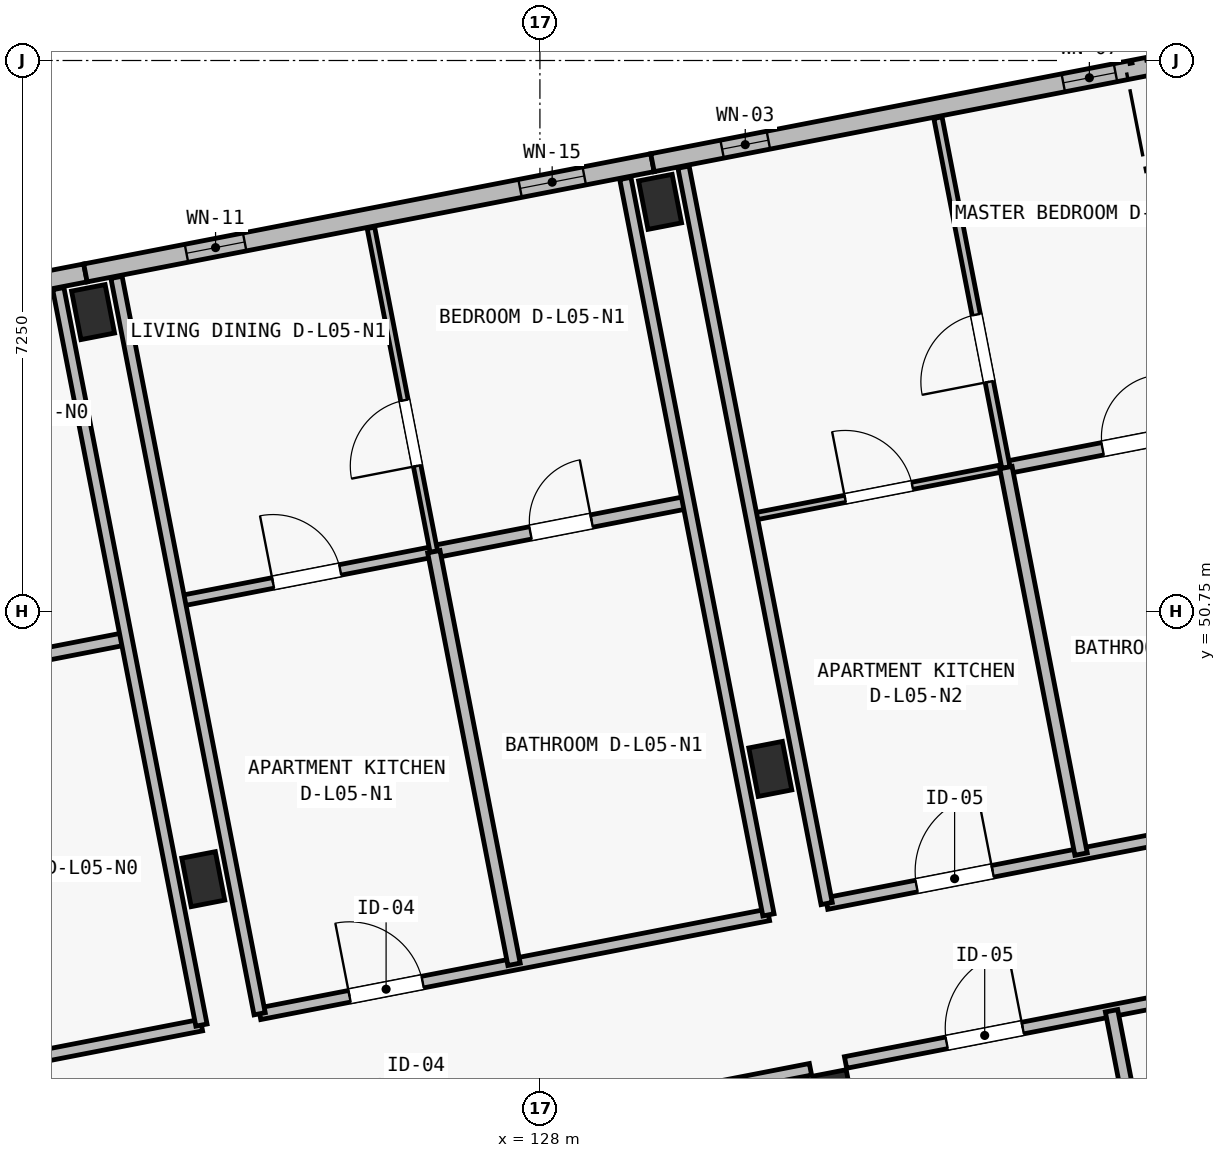
"""IFC4 building model, lengths in metres.
Left out: names, types, materials, properties, quantities, classifications, styles, units other than length and angle.
Written with IfcOpenShell. Run it as: python <this file> out.ifc"""

import sys

from ifc_helpers import new_model, si_unit, direction, frame, frame_2d, origin, origin_2d, place, context, subcontext, project, spatial, rectangle, extrude, element, fill, save


model = new_model("IFC4")
c1 = context("Model", 3, precision=1e-05, world=origin(), true_north=direction((0.0, 1.0)))
c2 = subcontext(c1, "Body", "Model", "MODEL_VIEW")
j1 = project(units=[si_unit("LENGTHUNIT", "METRE"), si_unit("PLANEANGLEUNIT", "RADIAN")], contexts=[c1])
p1 = place(None, origin())
s1 = spatial("IfcSite", under=j1, at=p1, CompositionType="ELEMENT")
p2 = place(p1, origin())
s2 = spatial("IfcBuilding", under=s1, at=p2, CompositionType="ELEMENT")
p3 = place(p2, frame((0.0, 0.0, 18.15)))
s3 = spatial("IfcBuildingStorey", under=s2, at=p3, CompositionType="ELEMENT", Elevation=18.15)
for number, where, z_axis, x_axis in (
    (1, (123.571, 47.23, 0.0), (0.0, 0.0, 1.0), (0.982, 0.191, 0.0)),
    (2, (122.121, 54.69, 0.0), (0.0, 0.0, 1.0), (0.982, 0.191, 0.0)),
    (3, (131.871, 44.361, 0.0), (0.0, 0.0, 1.0), (0.982, 0.191, 0.0)),
    (4, (131.031, 48.68, 0.0), (0.0, 0.0, 1.0), (0.982, 0.191, 0.0)),
    (5, (129.581, 56.14, 0.0), (0.0, 0.0, 1.0), (0.982, 0.191, 0.0)),
):
    element("IfcColumn", number, at=place(p3, frame(where, z_axis=z_axis, x_axis=x_axis)), inside=s3, PredefinedType="COLUMN", context=c2, shape_type="SweptSolid", body=[
        extrude(rectangle(XDim=0.45, YDim=0.65, at=origin_2d()), origin(), (0.0, 0.0, 1.0), 3.25),
    ])
p4 = place(p3, frame((114.045, 53.655, 0.0), z_axis=(0.0, 0.0, 1.0), x_axis=(0.981627273155, 0.190808533872, 0.0)))
e6 = element("IfcWall", 6, at=p4, inside=s3, PredefinedType="SOLIDWALL", context=c2, shape_type="SweptSolid", body=[
    extrude(rectangle(XDim=8.125, YDim=0.24, at=frame_2d((4.062, 0.0))), origin(), (0.0, 0.0, 1.0), 3.0),
])
p5 = place(p4, frame((2.41, 0.0, 0.5)))
e7 = element("IfcOpeningElement", 7, at=p5, cuts=e6, PredefinedType="OPENING", context=c2, shape_type="SweptSolid", body=[
    extrude(rectangle(XDim=0.64, YDim=2.18, at=frame_2d((0.32, 1.09))), frame((0.0, 0.135, 0.0), z_axis=(0.0, -1.0, 0.0), x_axis=(1.0, 0.0, 0.0)), (0.0, 0.0, 1.0), 0.27),
])
p6 = place(p4, frame((5.551, 0.0, 0.44)))
e8 = element("IfcOpeningElement", 8, at=p6, cuts=e6, PredefinedType="OPENING", context=c2, shape_type="SweptSolid", body=[
    extrude(rectangle(XDim=0.72, YDim=2.16, at=frame_2d((0.36, 1.08))), frame((0.0, 0.135, 0.0), z_axis=(0.0, -1.0, 0.0), x_axis=(1.0, 0.0, 0.0)), (0.0, 0.0, 1.0), 0.27),
])
p7 = place(p3, frame((122.02, 55.205, 0.0), z_axis=(0.0, 0.0, 1.0), x_axis=(0.981626422232, 0.190812911449, 0.0)))
e9 = element("IfcWall", 9, at=p7, inside=s3, PredefinedType="SOLIDWALL", context=c2, shape_type="SweptSolid", body=[
    extrude(rectangle(XDim=7.6, YDim=0.24, at=frame_2d((3.8, 0.0))), origin(), (0.0, 0.0, 1.0), 3.0),
])
p8 = place(p7, frame((1.354, 0.0, 0.44)))
e10 = element("IfcOpeningElement", 10, at=p8, cuts=e9, PredefinedType="OPENING", context=c2, shape_type="SweptSolid", body=[
    extrude(rectangle(XDim=0.78, YDim=2.2, at=frame_2d((0.39, 1.1))), frame((0.0, 0.135, 0.0), z_axis=(0.0, -1.0, 0.0), x_axis=(1.0, 0.0, 0.0)), (0.0, 0.0, 1.0), 0.27),
])
p9 = place(p7, frame((5.826, 0.0, 0.5)))
e11 = element("IfcOpeningElement", 11, at=p9, cuts=e9, PredefinedType="OPENING", context=c2, shape_type="SweptSolid", body=[
    extrude(rectangle(XDim=0.86, YDim=2.36, at=frame_2d((0.43, 1.18))), frame((0.0, 0.135, 0.0), z_axis=(0.0, -1.0, 0.0), x_axis=(1.0, 0.0, 0.0)), (0.0, 0.0, 1.0), 0.27),
])
p10 = place(p3, frame((129.481, 56.656, 0.0), z_axis=(0.0, 0.0, 1.0), x_axis=(0.981626422232, 0.190812911449, 0.0)))
e12 = element("IfcWall", 12, at=p10, inside=s3, PredefinedType="SOLIDWALL", context=c2, shape_type="SweptSolid", body=[
    extrude(rectangle(XDim=7.6, YDim=0.24, at=frame_2d((3.8, 0.0))), origin(), (0.0, 0.0, 1.0), 3.0),
])
p11 = place(p10, frame((0.934, 0.0, 0.5)))
e13 = element("IfcOpeningElement", 13, at=p11, cuts=e12, PredefinedType="OPENING", context=c2, shape_type="SweptSolid", body=[
    extrude(rectangle(XDim=0.62, YDim=2.28, at=frame_2d((0.31, 1.14))), frame((0.0, 0.135, 0.0), z_axis=(0.0, -1.0, 0.0), x_axis=(1.0, 0.0, 0.0)), (0.0, 0.0, 1.0), 0.27),
])
p12 = place(p10, frame((5.506, 0.0, 0.44)))
e14 = element("IfcOpeningElement", 14, at=p12, cuts=e12, PredefinedType="OPENING", context=c2, shape_type="SweptSolid", body=[
    extrude(rectangle(XDim=0.7, YDim=2.36, at=frame_2d((0.35, 1.18))), frame((0.0, 0.135, 0.0), z_axis=(0.0, -1.0, 0.0), x_axis=(1.0, 0.0, 0.0)), (0.0, 0.0, 1.0), 0.27),
])
p13 = place(p3, frame((124.561, 43.368, 0.0), z_axis=(0.0, 0.0, 1.0), x_axis=(0.981630356092, 0.190792672811, 0.0)))
e15 = element("IfcWall", 15, at=p13, inside=s3, PredefinedType="PARTITIONING", context=c2, shape_type="SweptSolid", body=[
    extrude(rectangle(XDim=7.13, YDim=0.155, at=frame_2d((3.565, 0.0))), origin(), (0.0, 0.0, 1.0), 2.97),
])
p14 = place(p13, frame((1.355, 0.0, 0.0)))
e16 = element("IfcOpeningElement", 16, at=p14, cuts=e15, PredefinedType="OPENING", context=c2, shape_type="SweptSolid", body=[
    extrude(rectangle(XDim=0.98, YDim=2.15, at=frame_2d((0.49, 1.075))), frame((0.0, 0.093, 0.0), z_axis=(0.0, -1.0, 0.0), x_axis=(1.0, 0.0, 0.0)), (0.0, 0.0, 1.0), 0.185),
])
p15 = place(p3, frame((132.021, 44.818, 0.0), z_axis=(0.0, 0.0, 1.0), x_axis=(0.981629109582, 0.190799086008, 0.0)))
e17 = element("IfcWall", 17, at=p15, inside=s3, PredefinedType="PARTITIONING", context=c2, shape_type="SweptSolid", body=[
    extrude(rectangle(XDim=7.13, YDim=0.155, at=frame_2d((3.565, 0.0))), origin(), (0.0, 0.0, 1.0), 2.97),
])
p16 = place(p15, frame((1.355, 0.0, 0.0)))
e18 = element("IfcOpeningElement", 18, at=p16, cuts=e17, PredefinedType="OPENING", context=c2, shape_type="SweptSolid", body=[
    extrude(rectangle(XDim=1.02, YDim=2.2, at=frame_2d((0.51, 1.1))), frame((0.0, 0.093, 0.0), z_axis=(0.0, -1.0, 0.0), x_axis=(1.0, 0.0, 0.0)), (0.0, 0.0, 1.0), 0.185),
])
p17 = place(p3, frame((136.259, 41.699, 0.0), z_axis=(0.0, 0.0, 1.0), x_axis=(-0.190835887914, 0.981621955686, 0.0)))
e19 = element("IfcWall", 19, at=p17, inside=s3, PredefinedType="PLUMBINGWALL", context=c2, shape_type="SweptSolid", body=[
    extrude(rectangle(XDim=3.87, YDim=0.165, at=frame_2d((1.935, 0.0))), origin(), (0.0, 0.0, 1.0), 2.97),
])
p18 = place(p3, frame((116.852, 44.009, 0.0), z_axis=(0.0, 0.0, 1.0), x_axis=(0.981629173664, 0.190798756314, 0.0)))
e20 = element("IfcWall", 20, at=p18, inside=s3, PredefinedType="PARTITIONING", context=c2, shape_type="SweptSolid", body=[
    extrude(rectangle(XDim=6.82, YDim=0.155, at=frame_2d((3.41, 0.0))), origin(), (0.0, 0.0, 1.0), 2.97),
])
p19 = place(p18, frame((1.205, 0.0, 0.0)))
e21 = element("IfcOpeningElement", 21, at=p19, cuts=e20, PredefinedType="OPENING", context=c2, shape_type="SweptSolid", body=[
    extrude(rectangle(XDim=1.02, YDim=2.2, at=frame_2d((0.51, 1.1))), frame((0.0, 0.093, 0.0), z_axis=(0.0, -1.0, 0.0), x_axis=(1.0, 0.0, 0.0)), (0.0, 0.0, 1.0), 0.185),
])
p20 = place(p3, frame((119.211, 49.744, 0.0), z_axis=(0.0, 0.0, 1.0), x_axis=(0.981629173664, 0.190798756314, 0.0)))
e22 = element("IfcWall", 22, at=p20, inside=s3, PredefinedType="PLUMBINGWALL", context=c2, shape_type="SweptSolid", body=[
    extrude(rectangle(XDim=3.41, YDim=0.165, at=frame_2d((1.705, 0.0))), origin(), (0.0, 0.0, 1.0), 2.97),
])
p21 = place(p20, frame((1.295, 0.0, 0.0)))
e23 = element("IfcOpeningElement", 23, at=p21, cuts=e22, PredefinedType="OPENING", context=c2, shape_type="SweptSolid", body=[
    extrude(rectangle(XDim=0.82, YDim=2.08, at=frame_2d((0.41, 1.04))), frame((0.0, 0.097, 0.0), z_axis=(0.0, -1.0, 0.0), x_axis=(1.0, 0.0, 0.0)), (0.0, 0.0, 1.0), 0.195),
])
p22 = place(p3, frame((123.547, 45.31, 0.0), z_axis=(0.0, 0.0, 1.0), x_axis=(-0.190809410863, 0.981627102685, 0.0)))
e24 = element("IfcWall", 24, at=p22, inside=s3, PredefinedType="PARTITIONING", context=c2, shape_type="SweptSolid", body=[
    extrude(rectangle(XDim=9.87, YDim=0.15, at=frame_2d((4.935, 0.0))), origin(), (0.0, 0.0, 1.0), 2.97),
])
p23 = place(p3, frame((124.312, 45.459, 0.0), z_axis=(0.0, 0.0, 1.0), x_axis=(0.981627870431, 0.190805461121, 0.0)))
e25 = element("IfcWall", 25, at=p23, inside=s3, PredefinedType="PARTITIONING", context=c2, shape_type="SweptSolid", body=[
    extrude(rectangle(XDim=6.82, YDim=0.155, at=frame_2d((3.41, 0.0))), origin(), (0.0, 0.0, 1.0), 2.97),
])
p24 = place(p23, frame((1.205, 0.0, 0.0)))
e26 = element("IfcOpeningElement", 26, at=p24, cuts=e25, PredefinedType="OPENING", context=c2, shape_type="SweptSolid", body=[
    extrude(rectangle(XDim=0.98, YDim=2.15, at=frame_2d((0.49, 1.075))), frame((0.0, 0.093, 0.0), z_axis=(0.0, -1.0, 0.0), x_axis=(1.0, 0.0, 0.0)), (0.0, 0.0, 1.0), 0.185),
])
p25 = place(p3, frame((123.257, 50.887, 0.0), z_axis=(0.0, 0.0, 1.0), x_axis=(0.981629173664, 0.190798756314, 0.0)))
e27 = element("IfcWall", 27, at=p25, inside=s3, PredefinedType="PARTITIONING", context=c2, shape_type="SweptSolid", body=[
    extrude(rectangle(XDim=3.41, YDim=0.14, at=frame_2d((1.705, 0.0))), origin(), (0.0, 0.0, 1.0), 2.97),
])
p26 = place(p25, frame((1.255, 0.0, 0.0)))
e28 = element("IfcOpeningElement", 28, at=p26, cuts=e27, PredefinedType="OPENING", context=c2, shape_type="SweptSolid", body=[
    extrude(rectangle(XDim=0.9, YDim=2.1, at=frame_2d((0.45, 1.05))), frame((0.0, 0.085, 0.0), z_axis=(0.0, -1.0, 0.0), x_axis=(1.0, 0.0, 0.0)), (0.0, 0.0, 1.0), 0.17),
])
p27 = place(p3, frame((126.604, 51.538, 0.0), z_axis=(0.0, 0.0, 1.0), x_axis=(0.98162656706, 0.190812166391, 0.0)))
e29 = element("IfcWall", 29, at=p27, inside=s3, PredefinedType="PLUMBINGWALL", context=c2, shape_type="SweptSolid", body=[
    extrude(rectangle(XDim=3.41, YDim=0.165, at=frame_2d((1.705, 0.0))), origin(), (0.0, 0.0, 1.0), 2.97),
])
p28 = place(p27, frame((1.295, 0.0, 0.0)))
e30 = element("IfcOpeningElement", 30, at=p28, cuts=e29, PredefinedType="OPENING", context=c2, shape_type="SweptSolid", body=[
    extrude(rectangle(XDim=0.82, YDim=2.08, at=frame_2d((0.41, 1.04))), frame((0.0, 0.097, 0.0), z_axis=(0.0, -1.0, 0.0), x_axis=(1.0, 0.0, 0.0)), (0.0, 0.0, 1.0), 0.195),
])
p29 = place(p3, frame((126.604, 51.538, 0.0), z_axis=(0.0, 0.0, 1.0), x_axis=(-0.190812443151, 0.981626513262, 0.0)))
e31 = element("IfcWall", 31, at=p29, inside=s3, PredefinedType="PARTITIONING", context=c2, shape_type="SweptSolid", body=[
    extrude(rectangle(XDim=4.34, YDim=0.1, at=frame_2d((2.17, 0.0))), origin(), (0.0, 0.0, 1.0), 2.97),
])
p30 = place(p29, frame((1.15, 0.0, 0.0)))
e32 = element("IfcOpeningElement", 32, at=p30, cuts=e31, PredefinedType="OPENING", context=c2, shape_type="SweptSolid", body=[
    extrude(rectangle(XDim=0.88, YDim=2.1, at=frame_2d((0.44, 1.05))), frame((0.0, 0.065, 0.0), z_axis=(0.0, -1.0, 0.0), x_axis=(1.0, 0.0, 0.0)), (0.0, 0.0, 1.0), 0.13),
])
p31 = place(p3, frame((127.66, 46.109, 0.0), z_axis=(0.0, 0.0, 1.0), x_axis=(-0.190815300433, 0.981625957848, 0.0)))
e33 = element("IfcWall", 33, at=p31, inside=s3, PredefinedType="PLUMBINGWALL", context=c2, shape_type="SweptSolid", body=[
    extrude(rectangle(XDim=5.53, YDim=0.165, at=frame_2d((2.765, 0.0))), origin(), (0.0, 0.0, 1.0), 2.97),
])
p32 = place(p3, frame((124.312, 45.459, 0.0), z_axis=(0.0, 0.0, 1.0), x_axis=(-0.190814044018, 0.981626202078, 0.0)))
e34 = element("IfcWall", 34, at=p32, inside=s3, PredefinedType="PARTITIONING", context=c2, shape_type="SweptSolid", body=[
    extrude(rectangle(XDim=9.87, YDim=0.15, at=frame_2d((4.935, 0.0))), origin(), (0.0, 0.0, 1.0), 2.97),
])
p33 = place(p3, frame((131.007, 46.76, 0.0), z_axis=(0.0, 0.0, 1.0), x_axis=(-0.190809410863, 0.981627102685, 0.0)))
e35 = element("IfcWall", 35, at=p33, inside=s3, PredefinedType="PARTITIONING", context=c2, shape_type="SweptSolid", body=[
    extrude(rectangle(XDim=9.87, YDim=0.15, at=frame_2d((4.935, 0.0))), origin(), (0.0, 0.0, 1.0), 2.97),
])
p34 = place(p3, frame((131.772, 46.909, 0.0), z_axis=(0.0, 0.0, 1.0), x_axis=(0.981622468528, 0.190833249935, 0.0)))
e36 = element("IfcWall", 36, at=p34, inside=s3, PredefinedType="PARTITIONING", context=c2, shape_type="SweptSolid", body=[
    extrude(rectangle(XDim=6.82, YDim=0.155, at=frame_2d((3.41, 0.0))), origin(), (0.0, 0.0, 1.0), 2.97),
])
p35 = place(p34, frame((1.205, 0.0, 0.0)))
e37 = element("IfcOpeningElement", 37, at=p35, cuts=e36, PredefinedType="OPENING", context=c2, shape_type="SweptSolid", body=[
    extrude(rectangle(XDim=1.02, YDim=2.2, at=frame_2d((0.51, 1.1))), frame((0.0, 0.093, 0.0), z_axis=(0.0, -1.0, 0.0), x_axis=(1.0, 0.0, 0.0)), (0.0, 0.0, 1.0), 0.185),
])
p36 = place(p3, frame((130.784, 51.994, 0.0), z_axis=(0.0, 0.0, 1.0), x_axis=(0.981629173664, 0.190798756314, 0.0)))
e38 = element("IfcWall", 38, at=p36, inside=s3, PredefinedType="PARTITIONING", context=c2, shape_type="SweptSolid", body=[
    extrude(rectangle(XDim=3.41, YDim=0.095, at=frame_2d((1.705, 0.0))), origin(), (0.0, 0.0, 1.0), 2.97),
])
p37 = place(p36, frame((1.255, 0.0, 0.0)))
e39 = element("IfcOpeningElement", 39, at=p37, cuts=e38, PredefinedType="OPENING", context=c2, shape_type="SweptSolid", body=[
    extrude(rectangle(XDim=0.9, YDim=2.1, at=frame_2d((0.45, 1.05))), frame((0.0, 0.062, 0.0), z_axis=(0.0, -1.0, 0.0), x_axis=(1.0, 0.0, 0.0)), (0.0, 0.0, 1.0), 0.125),
])
p38 = place(p3, frame((134.132, 52.644, 0.0), z_axis=(0.0, 0.0, 1.0), x_axis=(0.981629173664, 0.190798756314, 0.0)))
e40 = element("IfcWall", 40, at=p38, inside=s3, PredefinedType="PLUMBINGWALL", context=c2, shape_type="SweptSolid", body=[
    extrude(rectangle(XDim=3.41, YDim=0.165, at=frame_2d((1.705, 0.0))), origin(), (0.0, 0.0, 1.0), 2.97),
])
p39 = place(p38, frame((1.295, 0.0, 0.0)))
e41 = element("IfcOpeningElement", 41, at=p39, cuts=e40, PredefinedType="OPENING", context=c2, shape_type="SweptSolid", body=[
    extrude(rectangle(XDim=0.82, YDim=2.08, at=frame_2d((0.41, 1.04))), frame((0.0, 0.097, 0.0), z_axis=(0.0, -1.0, 0.0), x_axis=(1.0, 0.0, 0.0)), (0.0, 0.0, 1.0), 0.195),
])
p40 = place(p3, frame((134.132, 52.644, 0.0), z_axis=(0.0, 0.0, 1.0), x_axis=(-0.190837612577, 0.981621620394, 0.0)))
e42 = element("IfcWall", 42, at=p40, inside=s3, PredefinedType="PARTITIONING", context=c2, shape_type="SweptSolid", body=[
    extrude(rectangle(XDim=4.69, YDim=0.11, at=frame_2d((2.345, 0.0))), origin(), (0.0, 0.0, 1.0), 2.97),
])
p41 = place(p40, frame((1.15, 0.0, 0.0)))
e43 = element("IfcOpeningElement", 43, at=p41, cuts=e42, PredefinedType="OPENING", context=c2, shape_type="SweptSolid", body=[
    extrude(rectangle(XDim=0.9, YDim=2.1, at=frame_2d((0.45, 1.05))), frame((0.0, 0.07, 0.0), z_axis=(0.0, -1.0, 0.0), x_axis=(1.0, 0.0, 0.0)), (0.0, 0.0, 1.0), 0.14),
])
p42 = place(p3, frame((135.12, 47.559, 0.0), z_axis=(0.0, 0.0, 1.0), x_axis=(-0.190783877533, 0.981632065528, 0.0)))
e44 = element("IfcWall", 44, at=p42, inside=s3, PredefinedType="PLUMBINGWALL", context=c2, shape_type="SweptSolid", body=[
    extrude(rectangle(XDim=5.18, YDim=0.165, at=frame_2d((2.59, 0.0))), origin(), (0.0, 0.0, 1.0), 2.97),
])
p43 = place(p3, frame((131.772, 46.909, 0.0), z_axis=(0.0, 0.0, 1.0), x_axis=(-0.1907855758, 0.981631735462, 0.0)))
e45 = element("IfcWall", 45, at=p43, inside=s3, PredefinedType="PARTITIONING", context=c2, shape_type="SweptSolid", body=[
    extrude(rectangle(XDim=9.87, YDim=0.15, at=frame_2d((4.935, 0.0))), origin(), (0.0, 0.0, 1.0), 2.97),
])
p44 = place(p8, origin())
e46 = element("IfcWindow", 46, at=p44, inside=s3, PartitioningType="SINGLE_PANEL", PredefinedType="WINDOW", context=c2, shape_type="SweptSolid", body=[
    extrude(rectangle(XDim=0.78, YDim=2.2, at=frame_2d((0.39, 1.1))), frame((0.0, 0.03, 0.0), z_axis=(0.0, -1.0, 0.0), x_axis=(1.0, 0.0, 0.0)), (0.0, 0.0, 1.0), 0.06),
])
fill(e10, e46)
p45 = place(p9, origin())
e47 = element("IfcWindow", 47, at=p45, inside=s3, PartitioningType="SINGLE_PANEL", PredefinedType="WINDOW", context=c2, shape_type="SweptSolid", body=[
    extrude(rectangle(XDim=0.86, YDim=2.36, at=frame_2d((0.43, 1.18))), frame((0.0, 0.03, 0.0), z_axis=(0.0, -1.0, 0.0), x_axis=(1.0, 0.0, 0.0)), (0.0, 0.0, 1.0), 0.06),
])
fill(e11, e47)
p46 = place(p11, origin())
e48 = element("IfcWindow", 48, at=p46, inside=s3, PartitioningType="SINGLE_PANEL", PredefinedType="WINDOW", context=c2, shape_type="SweptSolid", body=[
    extrude(rectangle(XDim=0.62, YDim=2.28, at=frame_2d((0.31, 1.14))), frame((0.0, 0.03, 0.0), z_axis=(0.0, -1.0, 0.0), x_axis=(1.0, 0.0, 0.0)), (0.0, 0.0, 1.0), 0.06),
])
fill(e13, e48)
p47 = place(p12, origin())
e49 = element("IfcWindow", 49, at=p47, inside=s3, PartitioningType="SINGLE_PANEL", PredefinedType="WINDOW", context=c2, shape_type="SweptSolid", body=[
    extrude(rectangle(XDim=0.7, YDim=2.36, at=frame_2d((0.35, 1.18))), frame((0.0, 0.03, 0.0), z_axis=(0.0, -1.0, 0.0), x_axis=(1.0, 0.0, 0.0)), (0.0, 0.0, 1.0), 0.06),
])
fill(e14, e49)
p48 = place(p16, origin())
e50 = element("IfcDoor", 50, at=p48, inside=s3, OperationType="SINGLE_SWING_RIGHT", PredefinedType="DOOR", context=c2, shape_type="SweptSolid", body=[
    extrude(rectangle(XDim=1.02, YDim=2.2, at=frame_2d((0.51, 1.1))), frame((0.0, 0.025, 0.0), z_axis=(0.0, -1.0, 0.0), x_axis=(1.0, 0.0, 0.0)), (0.0, 0.0, 1.0), 0.05),
])
fill(e18, e50)
p49 = place(p24, origin())
e51 = element("IfcDoor", 51, at=p49, inside=s3, OperationType="SINGLE_SWING_LEFT", PredefinedType="DOOR", context=c2, shape_type="SweptSolid", body=[
    extrude(rectangle(XDim=0.98, YDim=2.15, at=frame_2d((0.49, 1.075))), frame((0.0, 0.025, 0.0), z_axis=(0.0, -1.0, 0.0), x_axis=(1.0, 0.0, 0.0)), (0.0, 0.0, 1.0), 0.05),
])
fill(e26, e51)
p50 = place(p26, origin())
e52 = element("IfcDoor", 52, at=p50, inside=s3, OperationType="SINGLE_SWING_LEFT", PredefinedType="DOOR", context=c2, shape_type="SweptSolid", body=[
    extrude(rectangle(XDim=0.9, YDim=2.1, at=frame_2d((0.45, 1.05))), frame((0.0, 0.025, 0.0), z_axis=(0.0, -1.0, 0.0), x_axis=(1.0, 0.0, 0.0)), (0.0, 0.0, 1.0), 0.05),
])
fill(e28, e52)
p51 = place(p28, origin())
e53 = element("IfcDoor", 53, at=p51, inside=s3, OperationType="SINGLE_SWING_RIGHT", PredefinedType="DOOR", context=c2, shape_type="SweptSolid", body=[
    extrude(rectangle(XDim=0.82, YDim=2.08, at=frame_2d((0.41, 1.04))), frame((0.0, 0.025, 0.0), z_axis=(0.0, -1.0, 0.0), x_axis=(1.0, 0.0, 0.0)), (0.0, 0.0, 1.0), 0.05),
])
fill(e30, e53)
p52 = place(p30, origin())
e54 = element("IfcDoor", 54, at=p52, inside=s3, OperationType="SINGLE_SWING_LEFT", PredefinedType="DOOR", context=c2, shape_type="SweptSolid", body=[
    extrude(rectangle(XDim=0.88, YDim=2.1, at=frame_2d((0.44, 1.05))), frame((0.0, 0.025, 0.0), z_axis=(0.0, -1.0, 0.0), x_axis=(1.0, 0.0, 0.0)), (0.0, 0.0, 1.0), 0.05),
])
fill(e32, e54)
p53 = place(p35, origin())
e55 = element("IfcDoor", 55, at=p53, inside=s3, OperationType="SINGLE_SWING_RIGHT", PredefinedType="DOOR", context=c2, shape_type="SweptSolid", body=[
    extrude(rectangle(XDim=1.02, YDim=2.2, at=frame_2d((0.51, 1.1))), frame((0.0, 0.025, 0.0), z_axis=(0.0, -1.0, 0.0), x_axis=(1.0, 0.0, 0.0)), (0.0, 0.0, 1.0), 0.05),
])
fill(e37, e55)
p54 = place(p37, origin())
e56 = element("IfcDoor", 56, at=p54, inside=s3, OperationType="SINGLE_SWING_LEFT", PredefinedType="DOOR", context=c2, shape_type="SweptSolid", body=[
    extrude(rectangle(XDim=0.9, YDim=2.1, at=frame_2d((0.45, 1.05))), frame((0.0, 0.025, 0.0), z_axis=(0.0, -1.0, 0.0), x_axis=(1.0, 0.0, 0.0)), (0.0, 0.0, 1.0), 0.05),
])
fill(e39, e56)
p55 = place(p39, origin())
e57 = element("IfcDoor", 57, at=p55, inside=s3, OperationType="SINGLE_SWING_RIGHT", PredefinedType="DOOR", context=c2, shape_type="SweptSolid", body=[
    extrude(rectangle(XDim=0.82, YDim=2.08, at=frame_2d((0.41, 1.04))), frame((0.0, 0.025, 0.0), z_axis=(0.0, -1.0, 0.0), x_axis=(1.0, 0.0, 0.0)), (0.0, 0.0, 1.0), 0.05),
])
fill(e41, e57)
p56 = place(p41, origin())
e58 = element("IfcDoor", 58, at=p56, inside=s3, OperationType="SINGLE_SWING_LEFT", PredefinedType="DOOR", context=c2, shape_type="SweptSolid", body=[
    extrude(rectangle(XDim=0.9, YDim=2.1, at=frame_2d((0.45, 1.05))), frame((0.0, 0.025, 0.0), z_axis=(0.0, -1.0, 0.0), x_axis=(1.0, 0.0, 0.0)), (0.0, 0.0, 1.0), 0.05),
])
fill(e43, e58)
save(model, sys.argv[1])
